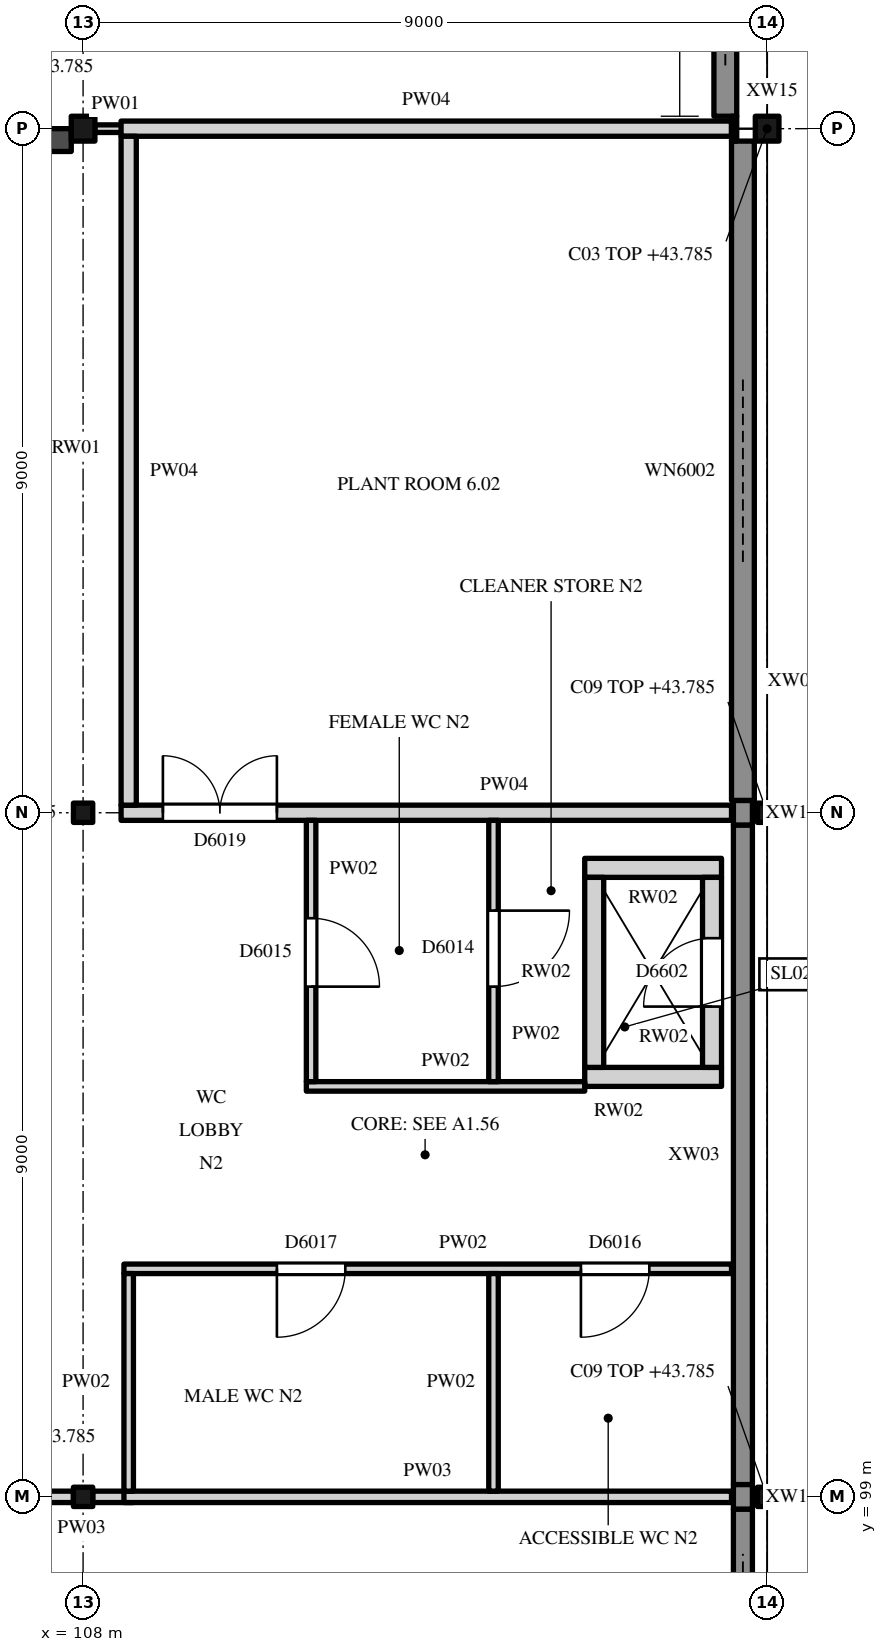
"""IFC4 building model, lengths in metres.
Left out: names, types, materials, properties, quantities, classifications, styles, units other than length and angle.
Written with IfcOpenShell. Run it as: python <this file> out.ifc"""

import sys

from ifc_helpers import new_model, si_unit, direction, frame, frame_2d, origin, origin_2d, place, context, subcontext, project, spatial, polyline, rectangle, i_section, outline, extrude, element, fill, save


model = new_model("IFC4")
c1 = context("Model", 3, precision=1e-05, world=origin(), true_north=direction((0.0, 1.0)))
c2 = subcontext(c1, "Body", "Model", "MODEL_VIEW")
j1 = project(units=[si_unit("LENGTHUNIT", "METRE"), si_unit("PLANEANGLEUNIT", "RADIAN")], contexts=[c1])
p1 = place(None, origin())
s1 = spatial("IfcSite", under=j1, at=p1, CompositionType="ELEMENT")
p2 = place(p1, origin())
s2 = spatial("IfcBuilding", under=s1, at=p2, CompositionType="ELEMENT")
p3 = place(p2, frame((0.0, 0.0, 36.0)))
s3 = spatial("IfcBuildingStorey", under=s2, at=p3, CompositionType="ELEMENT", Elevation=36.0)
for number, where, z_axis, x_axis in (
    (1, (108.0, 99.0, 0.0), (0.0, 0.0, 1.0), (1.0, 0.0, 0.0)),
    (2, (117.0, 99.0, 0.0), (0.0, 0.0, 1.0), (1.0, 0.0, 0.0)),
    (3, (108.0, 108.0, 0.0), (0.0, 0.0, 1.0), (1.0, 0.0, 0.0)),
    (4, (117.0, 108.0, 0.0), (0.0, 0.0, 1.0), (1.0, 0.0, 0.0)),
):
    element("IfcColumn", number, at=place(p3, frame(where, z_axis=z_axis, x_axis=x_axis)), inside=s3, PredefinedType="COLUMN", context=c2, shape_type="SweptSolid", body=[
        extrude(i_section(OverallWidth=0.254, OverallDepth=0.254, WebThickness=0.009, FlangeThickness=0.014, FilletRadius=0.014, at=origin_2d()), origin(), (0.0, 0.0, 1.0), 7.785),
    ])
for number, where, z_axis, x_axis in (
    (5, (108.0, 117.0, 0.0), (0.0, 0.0, 1.0), (1.0, 0.0, 0.0)),
    (6, (117.0, 117.0, 0.0), (0.0, 0.0, 1.0), (1.0, 0.0, 0.0)),
):
    element("IfcColumn", number, at=place(p3, frame(where, z_axis=z_axis, x_axis=x_axis)), inside=s3, PredefinedType="COLUMN", context=c2, shape_type="SweptSolid", body=[
        extrude(i_section(OverallWidth=0.311, OverallDepth=0.327, WebThickness=0.016, FlangeThickness=0.025, FilletRadius=0.017, at=origin_2d()), origin(), (0.0, 0.0, 1.0), 7.785),
    ])
p4 = place(p3, frame((99.156, 116.85, 0.0), z_axis=(0.0, 0.0, 1.0), x_axis=(1.0, 0.0, 0.0)))
e7 = element("IfcWall", 7, at=p4, inside=s3, PredefinedType="SHEAR", context=c2, shape_type="SweptSolid", body=[
    extrude(outline(polyline([(0.0, 0.0), (8.689, 0.0), (8.689, 7.871), (7.922, 8.56), (7.667, 8.751), (6.9, 9.193), (6.645, 9.32), (5.622, 9.651), (5.367, 9.692), (4.344, 9.799), (3.322, 9.692), (3.067, 9.651), (2.044, 9.32), (1.789, 9.193), (1.022, 8.751), (0.767, 8.56), (0.0, 7.871), (0.0, 0.0)])), frame((0.0, 0.15, 0.0), z_axis=(0.0, -1.0, 0.0), x_axis=(1.0, 0.0, 0.0)), (0.0, 0.0, 1.0), 0.3),
])
for number, where, z_axis, x_axis in (
    (8, (114.6, 104.525, 0.0), (0.0, 0.0, 1.0), (1.0, 0.0, 0.0)),
    (9, (114.6, 107.275, 0.0), (0.0, 0.0, 1.0), (1.0, 0.0, 0.0)),
):
    element("IfcWall", number, at=place(p3, frame(where, z_axis=z_axis, x_axis=x_axis)), inside=s3, PredefinedType="STANDARD", context=c2, shape_type="SweptSolid", body=[
        extrude(outline(polyline([(0.0, 0.0), (1.8, 0.0), (1.8, 8.27), (1.543, 8.501), (1.286, 8.715), (0.514, 9.159), (0.257, 9.301), (0.0, 9.385), (0.0, 0.0)])), frame((0.0, 0.125, 0.0), z_axis=(0.0, -1.0, 0.0), x_axis=(1.0, 0.0, 0.0)), (0.0, 0.0, 1.0), 0.25),
    ])
p5 = place(p3, frame((114.725, 104.65, 0.0), z_axis=(0.0, 0.0, 1.0), x_axis=(0.0, 1.0, 0.0)))
e10 = element("IfcWall", 10, at=p5, inside=s3, PredefinedType="STANDARD", context=c2, shape_type="SweptSolid", body=[
    extrude(rectangle(XDim=2.5, YDim=0.25, at=frame_2d((1.25, 0.0))), origin(), (0.0, 0.0, 1.0), 9.344),
])
p6 = place(p3, frame((116.275, 104.65, 0.0), z_axis=(0.0, 0.0, 1.0), x_axis=(0.0, 1.0, 0.0)))
e11 = element("IfcWall", 11, at=p6, inside=s3, PredefinedType="STANDARD", context=c2, shape_type="SweptSolid", body=[
    extrude(rectangle(XDim=2.5, YDim=0.25, at=frame_2d((1.25, 0.0))), origin(), (0.0, 0.0, 1.0), 8.382),
])
p7 = place(p6, frame((0.8, 0.0, 0.0)))
e12 = element("IfcOpeningElement", 12, at=p7, cuts=e11, PredefinedType="OPENING", context=c2, shape_type="SweptSolid", body=[
    extrude(rectangle(XDim=0.9, YDim=2.1, at=frame_2d((0.45, 1.05))), frame((0.0, 0.135, 0.0), z_axis=(0.0, -1.0, 0.0), x_axis=(1.0, 0.0, 0.0)), (0.0, 0.0, 1.0), 0.27),
])
p8 = place(p3, frame((116.681, 90.164, 0.0), z_axis=(0.0, 0.0, 1.0), x_axis=(0.0, 1.0, 0.0)))
e13 = element("IfcWall", 13, at=p8, inside=s3, PredefinedType="SOLIDWALL", context=c2, shape_type="SweptSolid", body=[
    extrude(rectangle(XDim=8.676, YDim=0.25, at=frame_2d((4.338, 0.0))), origin(), (0.0, 0.0, 1.0), 7.8),
])
p9 = place(p8, frame((0.586, 0.0, 1.6)))
e14 = element("IfcOpeningElement", 14, at=p9, cuts=e13, PredefinedType="OPENING", context=c2, shape_type="SweptSolid", body=[
    extrude(rectangle(XDim=1.6, YDim=1.2, at=frame_2d((0.8, 0.6))), frame((0.0, 0.135, 0.0), z_axis=(0.0, -1.0, 0.0), x_axis=(1.0, 0.0, 0.0)), (0.0, 0.0, 1.0), 0.27),
])
p10 = place(p8, frame((3.541, 0.0, 1.6)))
e15 = element("IfcOpeningElement", 15, at=p10, cuts=e13, PredefinedType="OPENING", context=c2, shape_type="SweptSolid", body=[
    extrude(rectangle(XDim=1.6, YDim=1.2, at=frame_2d((0.8, 0.6))), frame((0.0, 0.135, 0.0), z_axis=(0.0, -1.0, 0.0), x_axis=(1.0, 0.0, 0.0)), (0.0, 0.0, 1.0), 0.27),
])
p11 = place(p8, frame((6.486, 0.0, 1.6)))
e16 = element("IfcOpeningElement", 16, at=p11, cuts=e13, PredefinedType="OPENING", context=c2, shape_type="SweptSolid", body=[
    extrude(rectangle(XDim=1.6, YDim=1.2, at=frame_2d((0.8, 0.6))), frame((0.0, 0.135, 0.0), z_axis=(0.0, -1.0, 0.0), x_axis=(1.0, 0.0, 0.0)), (0.0, 0.0, 1.0), 0.27),
])
p12 = place(p3, frame((116.681, 99.161, 0.0), z_axis=(0.0, 0.0, 1.0), x_axis=(0.0, 1.0, 0.0)))
e17 = element("IfcWall", 17, at=p12, inside=s3, PredefinedType="SOLIDWALL", context=c2, shape_type="SweptSolid", body=[
    extrude(rectangle(XDim=8.678, YDim=0.25, at=frame_2d((4.339, 0.0))), origin(), (0.0, 0.0, 1.0), 7.8),
])
p13 = place(p3, frame((116.681, 108.161, 0.0), z_axis=(0.0, 0.0, 1.0), x_axis=(0.0, 1.0, 0.0)))
e18 = element("IfcWall", 18, at=p13, inside=s3, PredefinedType="SOLIDWALL", context=c2, shape_type="SweptSolid", body=[
    extrude(rectangle(XDim=8.676, YDim=0.3, at=frame_2d((4.338, 0.0))), origin(), (0.0, 0.0, 1.0), 7.8),
])
p14 = place(p13, frame((3.139, 0.0, 2.3)))
e19 = element("IfcOpeningElement", 19, at=p14, cuts=e18, PredefinedType="OPENING", context=c2, shape_type="SweptSolid", body=[
    extrude(rectangle(XDim=2.4, YDim=3.0, at=frame_2d((1.2, 1.5))), frame((0.0, 0.16, 0.0), z_axis=(0.0, -1.0, 0.0), x_axis=(1.0, 0.0, 0.0)), (0.0, 0.0, 1.0), 0.32),
])
p15 = place(p3, frame((116.45, 117.164, 0.0), z_axis=(0.0, 0.0, 1.0), x_axis=(0.0, 1.0, 0.0)))
e20 = element("IfcWall", 20, at=p15, inside=s3, PredefinedType="SOLIDWALL", context=c2, shape_type="SweptSolid", body=[
    extrude(rectangle(XDim=8.836, YDim=0.3, at=frame_2d((4.418, 0.0))), origin(), (0.0, 0.0, 1.0), 7.8),
])
p16 = place(p15, frame((0.668, 0.0, 1.6)))
e21 = element("IfcOpeningElement", 21, at=p16, cuts=e20, PredefinedType="OPENING", context=c2, shape_type="SweptSolid", body=[
    extrude(rectangle(XDim=1.6, YDim=1.2, at=frame_2d((0.8, 0.6))), frame((0.0, 0.16, 0.0), z_axis=(0.0, -1.0, 0.0), x_axis=(1.0, 0.0, 0.0)), (0.0, 0.0, 1.0), 0.32),
])
p17 = place(p15, frame((3.573, 0.0, 1.6)))
e22 = element("IfcOpeningElement", 22, at=p17, cuts=e20, PredefinedType="OPENING", context=c2, shape_type="SweptSolid", body=[
    extrude(rectangle(XDim=1.6, YDim=1.2, at=frame_2d((0.8, 0.6))), frame((0.0, 0.16, 0.0), z_axis=(0.0, -1.0, 0.0), x_axis=(1.0, 0.0, 0.0)), (0.0, 0.0, 1.0), 0.32),
])
p18 = place(p15, frame((6.568, 0.0, 1.6)))
e23 = element("IfcOpeningElement", 23, at=p18, cuts=e20, PredefinedType="OPENING", context=c2, shape_type="SweptSolid", body=[
    extrude(rectangle(XDim=1.6, YDim=1.2, at=frame_2d((0.8, 0.6))), frame((0.0, 0.16, 0.0), z_axis=(0.0, -1.0, 0.0), x_axis=(1.0, 0.0, 0.0)), (0.0, 0.0, 1.0), 0.32),
])
for number, where, z_axis, x_axis in (
    (24, (116.681, 98.839, 0.0), (0.0, 0.0, 1.0), (0.0, 1.0, 0.0)),
    (25, (116.681, 107.839, 0.0), (0.0, 0.0, 1.0), (0.0, 1.0, 0.0)),
):
    element("IfcWall", number, at=place(p3, frame(where, z_axis=z_axis, x_axis=x_axis)), inside=s3, PredefinedType="SOLIDWALL", context=c2, shape_type="SweptSolid", body=[
        extrude(rectangle(XDim=0.322, YDim=0.25, at=frame_2d((0.161, 0.0))), origin(), (0.0, 0.0, 1.0), 7.8),
    ])
p19 = place(p3, frame((116.566, 116.836, 0.0), z_axis=(0.0, 0.0, 1.0), x_axis=(0.0, 1.0, 0.0)))
e26 = element("IfcWall", 26, at=p19, inside=s3, PredefinedType="SOLIDWALL", context=c2, shape_type="SweptSolid", body=[
    extrude(rectangle(XDim=0.327, YDim=0.069, at=frame_2d((0.164, 0.0))), origin(), (0.0, 0.0, 1.0), 7.8),
])
p20 = place(p3, frame((107.4, 99.0, 0.0), z_axis=(0.0, 0.0, 1.0), x_axis=(1.0, 0.0, 0.0)))
e27 = element("IfcWall", 27, at=p20, inside=s3, PredefinedType="PARTITIONING", context=c2, shape_type="SweptSolid", body=[
    extrude(rectangle(XDim=0.473, YDim=0.15, at=frame_2d((0.236, 0.0))), origin(), (0.0, 0.0, 1.0), 7.731),
])
p21 = place(p3, frame((108.127, 99.0, 0.0), z_axis=(0.0, 0.0, 1.0), x_axis=(1.0, 0.0, 0.0)))
e28 = element("IfcWall", 28, at=p21, inside=s3, PredefinedType="PARTITIONING", context=c2, shape_type="SweptSolid", body=[
    extrude(rectangle(XDim=0.535, YDim=0.15, at=frame_2d((0.268, 0.0))), origin(), (0.0, 0.0, 1.0), 7.731),
])
p22 = place(p3, frame((108.538, 99.0, 0.0), z_axis=(0.0, 0.0, 1.0), x_axis=(1.0, 0.0, 0.0)))
e29 = element("IfcWall", 29, at=p22, inside=s3, PredefinedType="PARTITIONING", context=c2, shape_type="SweptSolid", body=[
    extrude(rectangle(XDim=7.994, YDim=0.15, at=frame_2d((3.997, 0.0))), origin(), (0.0, 0.0, 1.0), 7.731),
])
p23 = place(p3, frame((108.538, 102.0, 0.0), z_axis=(0.0, 0.0, 1.0), x_axis=(1.0, 0.0, 0.0)))
e30 = element("IfcWall", 30, at=p23, inside=s3, PredefinedType="PARTITIONING", context=c2, shape_type="SweptSolid", body=[
    extrude(rectangle(XDim=7.994, YDim=0.125, at=frame_2d((3.997, 0.0))), origin(), (0.0, 0.0, 1.0), 7.731),
])
p24 = place(p23, frame((6.012, 0.0, 0.0)))
e31 = element("IfcOpeningElement", 31, at=p24, cuts=e30, PredefinedType="OPENING", context=c2, shape_type="SweptSolid", body=[
    extrude(rectangle(XDim=0.9, YDim=2.1, at=frame_2d((0.45, 1.05))), frame((0.0, 0.073, 0.0), z_axis=(0.0, -1.0, 0.0), x_axis=(1.0, 0.0, 0.0)), (0.0, 0.0, 1.0), 0.145),
])
p25 = place(p23, frame((2.012, 0.0, 0.0)))
e32 = element("IfcOpeningElement", 32, at=p25, cuts=e30, PredefinedType="OPENING", context=c2, shape_type="SweptSolid", body=[
    extrude(rectangle(XDim=0.9, YDim=2.1, at=frame_2d((0.45, 1.05))), frame((0.0, 0.073, 0.0), z_axis=(0.0, -1.0, 0.0), x_axis=(1.0, 0.0, 0.0)), (0.0, 0.0, 1.0), 0.145),
])
p26 = place(p3, frame((110.938, 104.4, 0.0), z_axis=(0.0, 0.0, 1.0), x_axis=(1.0, 0.0, 0.0)))
e33 = element("IfcWall", 33, at=p26, inside=s3, PredefinedType="PARTITIONING", context=c2, shape_type="SweptSolid", body=[
    extrude(rectangle(XDim=3.663, YDim=0.125, at=frame_2d((1.831, 0.0))), origin(), (0.0, 0.0, 1.0), 7.731),
])
p27 = place(p3, frame((108.5, 108.0, 0.0), z_axis=(0.0, 0.0, 1.0), x_axis=(1.0, 0.0, 0.0)))
e34 = element("IfcWall", 34, at=p27, inside=s3, PredefinedType="PARTITIONING", context=c2, shape_type="SweptSolid", body=[
    extrude(rectangle(XDim=8.031, YDim=0.2, at=frame_2d((4.016, 0.0))), origin(), (0.0, 0.0, 1.0), 7.731),
])
p28 = place(p27, frame((0.55, 0.0, 0.0)))
e35 = element("IfcOpeningElement", 35, at=p28, cuts=e34, PredefinedType="OPENING", context=c2, shape_type="SweptSolid", body=[
    extrude(rectangle(XDim=1.5, YDim=2.4, at=frame_2d((0.75, 1.2))), frame((0.0, 0.11, 0.0), z_axis=(0.0, -1.0, 0.0), x_axis=(1.0, 0.0, 0.0)), (0.0, 0.0, 1.0), 0.22),
])
p29 = place(p3, frame((108.156, 117.0, 0.0), z_axis=(0.0, 0.0, 1.0), x_axis=(1.0, 0.0, 0.0)))
e36 = element("IfcWall", 36, at=p29, inside=s3, PredefinedType="PARTITIONING", context=c2, shape_type="SweptSolid", body=[
    extrude(rectangle(XDim=0.544, YDim=0.1, at=frame_2d((0.272, 0.0))), origin(), (0.0, 0.0, 1.0), 7.731),
])
p30 = place(p3, frame((108.5, 117.0, 0.0), z_axis=(0.0, 0.0, 1.0), x_axis=(1.0, 0.0, 0.0)))
e37 = element("IfcWall", 37, at=p30, inside=s3, PredefinedType="PARTITIONING", context=c2, shape_type="SweptSolid", body=[
    extrude(rectangle(XDim=8.031, YDim=0.2, at=frame_2d((4.016, 0.0))), origin(), (0.0, 0.0, 1.0), 7.731),
])
p31 = place(p3, frame((108.6, 99.075, 0.0), z_axis=(0.0, 0.0, 1.0), x_axis=(0.0, 1.0, 0.0)))
e38 = element("IfcWall", 38, at=p31, inside=s3, PredefinedType="PARTITIONING", context=c2, shape_type="SweptSolid", body=[
    extrude(rectangle(XDim=2.863, YDim=0.125, at=frame_2d((1.431, 0.0))), origin(), (0.0, 0.0, 1.0), 7.731),
])
p32 = place(p3, frame((108.6, 108.1, 0.0), z_axis=(0.0, 0.0, 1.0), x_axis=(0.0, 1.0, 0.0)))
e39 = element("IfcWall", 39, at=p32, inside=s3, PredefinedType="PARTITIONING", context=c2, shape_type="SweptSolid", body=[
    extrude(rectangle(XDim=8.8, YDim=0.2, at=frame_2d((4.4, 0.0))), origin(), (0.0, 0.0, 1.0), 7.731),
])
p33 = place(p3, frame((111.0, 104.462, 0.0), z_axis=(0.0, 0.0, 1.0), x_axis=(0.0, 1.0, 0.0)))
e40 = element("IfcWall", 40, at=p33, inside=s3, PredefinedType="PARTITIONING", context=c2, shape_type="SweptSolid", body=[
    extrude(rectangle(XDim=3.438, YDim=0.125, at=frame_2d((1.719, 0.0))), origin(), (0.0, 0.0, 1.0), 7.731),
])
p34 = place(p33, frame((1.25, 0.0, 0.0)))
e41 = element("IfcOpeningElement", 41, at=p34, cuts=e40, PredefinedType="OPENING", context=c2, shape_type="SweptSolid", body=[
    extrude(rectangle(XDim=0.9, YDim=2.1, at=frame_2d((0.45, 1.05))), frame((0.0, 0.073, 0.0), z_axis=(0.0, -1.0, 0.0), x_axis=(1.0, 0.0, 0.0)), (0.0, 0.0, 1.0), 0.145),
])
p35 = place(p3, frame((113.4, 99.075, 0.0), z_axis=(0.0, 0.0, 1.0), x_axis=(0.0, 1.0, 0.0)))
e42 = element("IfcWall", 42, at=p35, inside=s3, PredefinedType="PARTITIONING", context=c2, shape_type="SweptSolid", body=[
    extrude(rectangle(XDim=2.863, YDim=0.125, at=frame_2d((1.431, 0.0))), origin(), (0.0, 0.0, 1.0), 7.731),
])
p36 = place(p3, frame((113.4, 104.462, 0.0), z_axis=(0.0, 0.0, 1.0), x_axis=(0.0, 1.0, 0.0)))
e43 = element("IfcWall", 43, at=p36, inside=s3, PredefinedType="PARTITIONING", context=c2, shape_type="SweptSolid", body=[
    extrude(rectangle(XDim=3.438, YDim=0.125, at=frame_2d((1.719, 0.0))), origin(), (0.0, 0.0, 1.0), 7.731),
])
p37 = place(p36, frame((1.25, 0.0, 0.0)))
e44 = element("IfcOpeningElement", 44, at=p37, cuts=e43, PredefinedType="OPENING", context=c2, shape_type="SweptSolid", body=[
    extrude(rectangle(XDim=1.0, YDim=2.1, at=frame_2d((0.5, 1.05))), frame((0.0, 0.073, 0.0), z_axis=(0.0, -1.0, 0.0), x_axis=(1.0, 0.0, 0.0)), (0.0, 0.0, 1.0), 0.145),
])
p38 = place(p7, origin())
e45 = element("IfcDoor", 45, at=p38, inside=s3, OperationType="SINGLE_SWING_RIGHT", PredefinedType="DOOR", context=c2, shape_type="SweptSolid", body=[
    extrude(rectangle(XDim=0.9, YDim=2.1, at=frame_2d((0.45, 1.05))), frame((0.0, 0.025, 0.0), z_axis=(0.0, -1.0, 0.0), x_axis=(1.0, 0.0, 0.0)), (0.0, 0.0, 1.0), 0.05),
])
fill(e12, e45)
p39 = place(p14, origin())
e46 = element("IfcWindow", 46, at=p39, inside=s3, PartitioningType="TRIPLE_PANEL_VERTICAL", PredefinedType="WINDOW", context=c2, shape_type="SweptSolid", body=[
    extrude(rectangle(XDim=2.4, YDim=3.0, at=frame_2d((1.2, 1.5))), frame((0.0, 0.03, 0.0), z_axis=(0.0, -1.0, 0.0), x_axis=(1.0, 0.0, 0.0)), (0.0, 0.0, 1.0), 0.06),
])
fill(e19, e46)
p40 = place(p11, origin())
e47 = element("IfcWindow", 47, at=p40, inside=s3, PartitioningType="SINGLE_PANEL", PredefinedType="WINDOW", context=c2, shape_type="SweptSolid", body=[
    extrude(rectangle(XDim=1.6, YDim=1.2, at=frame_2d((0.8, 0.6))), frame((0.0, 0.03, 0.0), z_axis=(0.0, -1.0, 0.0), x_axis=(1.0, 0.0, 0.0)), (0.0, 0.0, 1.0), 0.06),
])
fill(e16, e47)
p41 = place(p16, origin())
e48 = element("IfcWindow", 48, at=p41, inside=s3, PartitioningType="SINGLE_PANEL", PredefinedType="WINDOW", context=c2, shape_type="SweptSolid", body=[
    extrude(rectangle(XDim=1.6, YDim=1.2, at=frame_2d((0.8, 0.6))), frame((0.0, 0.03, 0.0), z_axis=(0.0, -1.0, 0.0), x_axis=(1.0, 0.0, 0.0)), (0.0, 0.0, 1.0), 0.06),
])
fill(e21, e48)
p42 = place(p37, origin())
e49 = element("IfcDoor", 49, at=p42, inside=s3, OperationType="SINGLE_SWING_RIGHT", PredefinedType="DOOR", context=c2, shape_type="SweptSolid", body=[
    extrude(rectangle(XDim=1.0, YDim=2.1, at=frame_2d((0.5, 1.05))), frame((0.0, 0.025, 0.0), z_axis=(0.0, -1.0, 0.0), x_axis=(1.0, 0.0, 0.0)), (0.0, 0.0, 1.0), 0.05),
])
fill(e44, e49)
p43 = place(p34, origin())
e50 = element("IfcDoor", 50, at=p43, inside=s3, OperationType="SINGLE_SWING_LEFT", PredefinedType="DOOR", context=c2, shape_type="SweptSolid", body=[
    extrude(rectangle(XDim=0.9, YDim=2.1, at=frame_2d((0.45, 1.05))), frame((0.0, 0.025, 0.0), z_axis=(0.0, -1.0, 0.0), x_axis=(1.0, 0.0, 0.0)), (0.0, 0.0, 1.0), 0.05),
])
fill(e41, e50)
p44 = place(p24, origin())
e51 = element("IfcDoor", 51, at=p44, inside=s3, OperationType="SINGLE_SWING_LEFT", PredefinedType="DOOR", context=c2, shape_type="SweptSolid", body=[
    extrude(rectangle(XDim=0.9, YDim=2.1, at=frame_2d((0.45, 1.05))), frame((0.0, 0.025, 0.0), z_axis=(0.0, -1.0, 0.0), x_axis=(1.0, 0.0, 0.0)), (0.0, 0.0, 1.0), 0.05),
])
fill(e31, e51)
p45 = place(p25, origin())
e52 = element("IfcDoor", 52, at=p45, inside=s3, OperationType="SINGLE_SWING_LEFT", PredefinedType="DOOR", context=c2, shape_type="SweptSolid", body=[
    extrude(rectangle(XDim=0.9, YDim=2.1, at=frame_2d((0.45, 1.05))), frame((0.0, 0.025, 0.0), z_axis=(0.0, -1.0, 0.0), x_axis=(1.0, 0.0, 0.0)), (0.0, 0.0, 1.0), 0.05),
])
fill(e32, e52)
p46 = place(p28, origin())
e53 = element("IfcDoor", 53, at=p46, inside=s3, OperationType="DOUBLE_DOOR_SINGLE_SWING", PredefinedType="DOOR", context=c2, shape_type="SweptSolid", body=[
    extrude(rectangle(XDim=1.5, YDim=2.4, at=frame_2d((0.75, 1.2))), frame((0.0, 0.025, 0.0), z_axis=(0.0, -1.0, 0.0), x_axis=(1.0, 0.0, 0.0)), (0.0, 0.0, 1.0), 0.05),
])
fill(e35, e53)
save(model, sys.argv[1])
